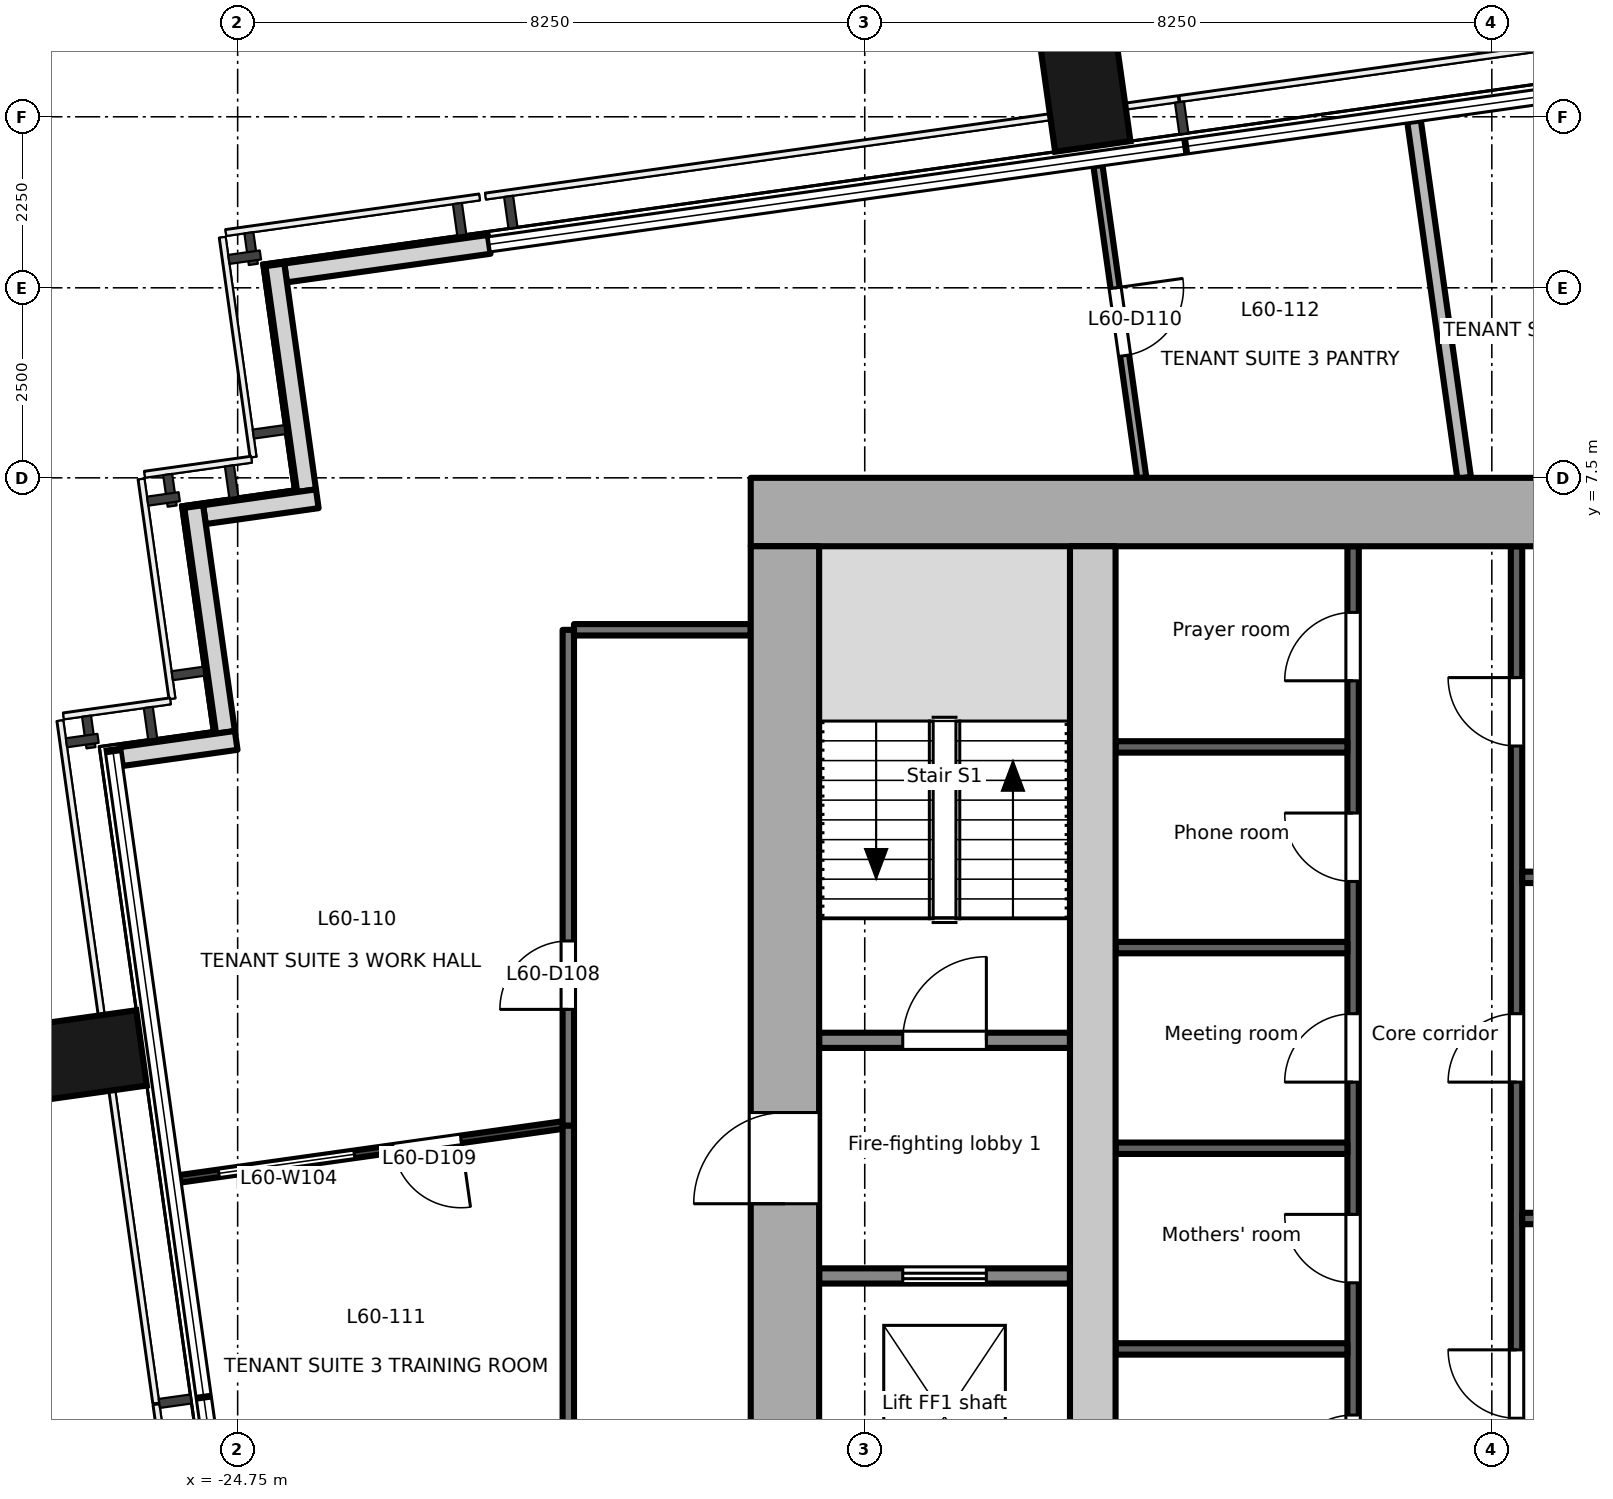
"""IFC4 building model, lengths in metres.
Left out: names, types, materials, properties, quantities, classifications, styles, units other than length and angle.
Written with IfcOpenShell. Run it as: python <this file> out.ifc"""

import sys

from ifc_helpers import new_model, si_unit, direction, frame, frame_2d, origin, origin_2d, place, context, subcontext, project, spatial, rectangle, extrude, element, fill, save


model = new_model("IFC4")
c1 = context("Model", 3, precision=1e-05, world=origin(), true_north=direction((0.0, 1.0)))
c2 = subcontext(c1, "Body", "Model", "MODEL_VIEW")
j1 = project(units=[si_unit("LENGTHUNIT", "METRE"), si_unit("PLANEANGLEUNIT", "RADIAN")], contexts=[c1])
p1 = place(None, origin())
s1 = spatial("IfcSite", under=j1, at=p1, CompositionType="ELEMENT")
p2 = place(p1, origin())
s2 = spatial("IfcBuilding", under=s1, at=p2, CompositionType="ELEMENT")
p3 = place(p2, frame((0.0, 0.0, 262.9)))
s3 = spatial("IfcBuildingStorey", under=s2, at=p3, CompositionType="ELEMENT", Elevation=262.9)
for number, where, z_axis, x_axis in (
    (1, (-26.906, -0.125, -0.2), (0.0, 0.0, 1.0), (-0.139, 0.99, 0.0)),
    (2, (-13.625, 12.751, -0.2), (0.0, 0.0, 1.0), (0.99, 0.139, 0.0)),
):
    element("IfcColumn", number, at=place(p3, frame(where, z_axis=z_axis, x_axis=x_axis)), inside=s3, PredefinedType="COLUMN", context=c2, shape_type="SweptSolid", body=[
        extrude(rectangle(XDim=1.0, YDim=1.8, at=origin_2d()), origin(), (0.0, 0.0, 1.0), 3.9),
    ])
p4 = place(p3, frame((-21.44, 10.572, 0.0), z_axis=(0.0, 0.0, 1.0), x_axis=(-0.990293105353, -0.138994839796, 0.0)))
e3 = element("IfcWall", 3, at=p4, inside=s3, PredefinedType="SOLIDWALL", context=c2, shape_type="SweptSolid", body=[
    extrude(rectangle(XDim=2.705, YDim=0.25, at=frame_2d((1.353, 0.0))), origin(), (0.0, 0.0, 1.0), 3.7),
])
p5 = place(p3, frame((-24.26, 10.302, 0.0), z_axis=(0.0, 0.0, 1.0), x_axis=(0.138994228812, -0.990293191109, 0.0)))
e4 = element("IfcWall", 4, at=p5, inside=s3, PredefinedType="SOLIDWALL", context=c2, shape_type="SweptSolid", body=[
    extrude(rectangle(XDim=3.0, YDim=0.25, at=frame_2d((1.5, 0.0))), origin(), (0.0, 0.0, 1.0), 3.7),
])
p6 = place(p3, frame((-23.702, 7.225, 0.0), z_axis=(0.0, 0.0, 1.0), x_axis=(-0.990243596651, -0.13934711799, 0.0)))
e5 = element("IfcWall", 5, at=p6, inside=s3, PredefinedType="SOLIDWALL", context=c2, shape_type="SweptSolid", body=[
    extrude(rectangle(XDim=1.5, YDim=0.25, at=frame_2d((0.75, 0.0))), origin(), (0.0, 0.0, 1.0), 3.7),
])
p7 = place(p3, frame((-25.328, 7.122, 0.0), z_axis=(0.0, 0.0, 1.0), x_axis=(0.139358350296, -0.990242015975, 0.0)))
e6 = element("IfcWall", 6, at=p7, inside=s3, PredefinedType="SOLIDWALL", context=c2, shape_type="SweptSolid", body=[
    extrude(rectangle(XDim=2.999, YDim=0.25, at=frame_2d((1.5, 0.0))), origin(), (0.0, 0.0, 1.0), 3.7),
])
p8 = place(p3, frame((-24.769, 4.046, 0.0), z_axis=(0.0, 0.0, 1.0), x_axis=(-0.990260716096, -0.139225407725, 0.0)))
e7 = element("IfcWall", 7, at=p8, inside=s3, PredefinedType="SOLIDWALL", context=c2, shape_type="SweptSolid", body=[
    extrude(rectangle(XDim=1.526, YDim=0.25, at=frame_2d((0.763, 0.0))), origin(), (0.0, 0.0, 1.0), 3.7),
])
p9 = place(p3, frame((-18.0, 7.05, -0.2), z_axis=(0.0, 0.0, 1.0), x_axis=(1.0, 0.0, 0.0)))
e8 = element("IfcWall", 8, at=p9, inside=s3, PredefinedType="SHEAR", context=c2, shape_type="SweptSolid", body=[
    extrude(rectangle(XDim=36.0, YDim=0.9, at=frame_2d((18.0, 0.0))), origin(), (0.0, 0.0, 1.0), 3.9),
])
p10 = place(p3, frame((-17.55, -6.6, -0.2), z_axis=(0.0, 0.0, 1.0), x_axis=(0.0, 1.0, 0.0)))
e9 = element("IfcWall", 9, at=p10, inside=s3, PredefinedType="SHEAR", context=c2, shape_type="SweptSolid", body=[
    extrude(rectangle(XDim=13.2, YDim=0.9, at=frame_2d((6.6, 0.0))), origin(), (0.0, 0.0, 1.0), 3.9),
])
p11 = place(p10, frame((4.55, 0.0, 0.2)))
e10 = element("IfcOpeningElement", 10, at=p11, cuts=e9, PredefinedType="OPENING", context=c2, shape_type="SweptSolid", body=[
    extrude(rectangle(XDim=1.2, YDim=2.1, at=frame_2d((0.6, 1.05))), frame((0.0, 0.46, 0.0), z_axis=(0.0, -1.0, 0.0), x_axis=(1.0, 0.0, 0.0)), (0.0, 0.0, 1.0), 0.921),
])
p12 = place(p3, frame((-13.5, -6.6, -0.2), z_axis=(0.0, 0.0, 1.0), x_axis=(0.0, 1.0, 0.0)))
e11 = element("IfcWall", 11, at=p12, inside=s3, PredefinedType="SHEAR", context=c2, shape_type="SweptSolid", body=[
    extrude(rectangle(XDim=13.2, YDim=0.6, at=frame_2d((6.6, 0.0))), origin(), (0.0, 0.0, 1.0), 3.9),
])
p13 = place(p3, frame((-17.1, -3.0, 0.0), z_axis=(0.0, 0.0, 1.0), x_axis=(1.0, 0.0, 0.0)))
e12 = element("IfcWall", 12, at=p13, inside=s3, PredefinedType="PARTITIONING", context=c2, shape_type="SweptSolid", body=[
    extrude(rectangle(XDim=3.3, YDim=0.2, at=frame_2d((1.65, 0.0))), origin(), (0.0, 0.0, 1.0), 3.7),
])
p14 = place(p13, frame((1.1, 0.0, 0.0)))
e13 = element("IfcOpeningElement", 13, at=p14, cuts=e12, PredefinedType="OPENING", context=c2, shape_type="SweptSolid", body=[
    extrude(rectangle(XDim=1.1, YDim=2.1, at=frame_2d((0.55, 1.05))), frame((0.0, 0.111, 0.0), z_axis=(0.0, -1.0, 0.0), x_axis=(1.0, 0.0, 0.0)), (0.0, 0.0, 1.0), 0.221),
])
p15 = place(p3, frame((-17.1, 0.1, 0.0), z_axis=(0.0, 0.0, 1.0), x_axis=(1.0, 0.0, 0.0)))
e14 = element("IfcWall", 14, at=p15, inside=s3, PredefinedType="PARTITIONING", context=c2, shape_type="SweptSolid", body=[
    extrude(rectangle(XDim=3.3, YDim=0.2, at=frame_2d((1.65, 0.0))), origin(), (0.0, 0.0, 1.0), 3.7),
])
p16 = place(p15, frame((1.1, 0.0, 0.0)))
e15 = element("IfcOpeningElement", 15, at=p16, cuts=e14, PredefinedType="OPENING", context=c2, shape_type="SweptSolid", body=[
    extrude(rectangle(XDim=1.1, YDim=2.1, at=frame_2d((0.55, 1.05))), frame((0.0, 0.111, 0.0), z_axis=(0.0, -1.0, 0.0), x_axis=(1.0, 0.0, 0.0)), (0.0, 0.0, 1.0), 0.221),
])
p17 = place(p3, frame((-10.075, -6.6, 0.0), z_axis=(0.0, 0.0, 1.0), x_axis=(0.0, 1.0, 0.0)))
e16 = element("IfcWall", 16, at=p17, inside=s3, PredefinedType="PARTITIONING", context=c2, shape_type="SweptSolid", body=[
    extrude(rectangle(XDim=13.2, YDim=0.15, at=frame_2d((6.6, 0.0))), origin(), (0.0, 0.0, 1.0), 3.7),
])
p18 = place(p17, frame((0.87, 0.0, 0.0)))
e17 = element("IfcOpeningElement", 17, at=p18, cuts=e16, PredefinedType="OPENING", context=c2, shape_type="SweptSolid", body=[
    extrude(rectangle(XDim=0.9, YDim=2.1, at=frame_2d((0.45, 1.05))), frame((0.0, 0.085, 0.0), z_axis=(0.0, -1.0, 0.0), x_axis=(1.0, 0.0, 0.0)), (0.0, 0.0, 1.0), 0.171),
])
p19 = place(p17, frame((3.51, 0.0, 0.0)))
e18 = element("IfcOpeningElement", 18, at=p19, cuts=e16, PredefinedType="OPENING", context=c2, shape_type="SweptSolid", body=[
    extrude(rectangle(XDim=0.9, YDim=2.1, at=frame_2d((0.45, 1.05))), frame((0.0, 0.085, 0.0), z_axis=(0.0, -1.0, 0.0), x_axis=(1.0, 0.0, 0.0)), (0.0, 0.0, 1.0), 0.171),
])
p20 = place(p17, frame((6.15, 0.0, 0.0)))
e19 = element("IfcOpeningElement", 19, at=p20, cuts=e16, PredefinedType="OPENING", context=c2, shape_type="SweptSolid", body=[
    extrude(rectangle(XDim=0.9, YDim=2.1, at=frame_2d((0.45, 1.05))), frame((0.0, 0.085, 0.0), z_axis=(0.0, -1.0, 0.0), x_axis=(1.0, 0.0, 0.0)), (0.0, 0.0, 1.0), 0.171),
])
p21 = place(p17, frame((8.79, 0.0, 0.0)))
e20 = element("IfcOpeningElement", 20, at=p21, cuts=e16, PredefinedType="OPENING", context=c2, shape_type="SweptSolid", body=[
    extrude(rectangle(XDim=0.9, YDim=2.1, at=frame_2d((0.45, 1.05))), frame((0.0, 0.085, 0.0), z_axis=(0.0, -1.0, 0.0), x_axis=(1.0, 0.0, 0.0)), (0.0, 0.0, 1.0), 0.171),
])
p22 = place(p17, frame((11.43, 0.0, 0.0)))
e21 = element("IfcOpeningElement", 21, at=p22, cuts=e16, PredefinedType="OPENING", context=c2, shape_type="SweptSolid", body=[
    extrude(rectangle(XDim=0.9, YDim=2.1, at=frame_2d((0.45, 1.05))), frame((0.0, 0.085, 0.0), z_axis=(0.0, -1.0, 0.0), x_axis=(1.0, 0.0, 0.0)), (0.0, 0.0, 1.0), 0.171),
])
for number, where, z_axis, x_axis in (
    (22, (-13.2, -3.96, 0.0), (0.0, 0.0, 1.0), (1.0, 0.0, 0.0)),
    (23, (-13.2, -1.32, 0.0), (0.0, 0.0, 1.0), (1.0, 0.0, 0.0)),
    (24, (-13.2, 1.32, 0.0), (0.0, 0.0, 1.0), (1.0, 0.0, 0.0)),
    (25, (-13.2, 3.96, 0.0), (0.0, 0.0, 1.0), (1.0, 0.0, 0.0)),
):
    element("IfcWall", number, at=place(p3, frame(where, z_axis=z_axis, x_axis=x_axis)), inside=s3, PredefinedType="PARTITIONING", context=c2, shape_type="SweptSolid", body=[
        extrude(rectangle(XDim=3.05, YDim=0.15, at=frame_2d((1.525, 0.0))), origin(), (0.0, 0.0, 1.0), 3.7),
    ])
p23 = place(p3, frame((-7.925, -6.6, 0.0), z_axis=(0.0, 0.0, 1.0), x_axis=(0.0, 1.0, 0.0)))
e26 = element("IfcWall", 26, at=p23, inside=s3, PredefinedType="PARTITIONING", context=c2, shape_type="SweptSolid", body=[
    extrude(rectangle(XDim=13.2, YDim=0.15, at=frame_2d((6.6, 0.0))), origin(), (0.0, 0.0, 1.0), 3.7),
])
p24 = place(p23, frame((1.728, 0.0, 0.0)))
e27 = element("IfcOpeningElement", 27, at=p24, cuts=e26, PredefinedType="OPENING", context=c2, shape_type="SweptSolid", body=[
    extrude(rectangle(XDim=0.9, YDim=2.1, at=frame_2d((0.45, 1.05))), frame((0.0, 0.085, 0.0), z_axis=(0.0, -1.0, 0.0), x_axis=(1.0, 0.0, 0.0)), (0.0, 0.0, 1.0), 0.171),
])
p25 = place(p23, frame((6.15, 0.0, 0.0)))
e28 = element("IfcOpeningElement", 28, at=p25, cuts=e26, PredefinedType="OPENING", context=c2, shape_type="SweptSolid", body=[
    extrude(rectangle(XDim=0.9, YDim=2.1, at=frame_2d((0.45, 1.05))), frame((0.0, 0.085, 0.0), z_axis=(0.0, -1.0, 0.0), x_axis=(1.0, 0.0, 0.0)), (0.0, 0.0, 1.0), 0.171),
])
p26 = place(p23, frame((10.572, 0.0, 0.0)))
e29 = element("IfcOpeningElement", 29, at=p26, cuts=e26, PredefinedType="OPENING", context=c2, shape_type="SweptSolid", body=[
    extrude(rectangle(XDim=0.9, YDim=2.1, at=frame_2d((0.45, 1.05))), frame((0.0, 0.085, 0.0), z_axis=(0.0, -1.0, 0.0), x_axis=(1.0, 0.0, 0.0)), (0.0, 0.0, 1.0), 0.171),
])
for number, where, z_axis, x_axis in (
    (30, (-7.85, -2.244, 0.0), (0.0, 0.0, 1.0), (1.0, 0.0, 0.0)),
    (31, (-7.85, 2.244, 0.0), (0.0, 0.0, 1.0), (1.0, 0.0, 0.0)),
):
    element("IfcWall", number, at=place(p3, frame(where, z_axis=z_axis, x_axis=x_axis)), inside=s3, PredefinedType="PARTITIONING", context=c2, shape_type="SweptSolid", body=[
        extrude(rectangle(XDim=3.05, YDim=0.15, at=frame_2d((1.525, 0.0))), origin(), (0.0, 0.0, 1.0), 3.7),
    ])
p27 = place(p3, frame((-20.4, -1.024, 0.0), z_axis=(0.0, 0.0, 1.0), x_axis=(0.0, 1.0, 0.0)))
e32 = element("IfcWall", 32, at=p27, inside=s3, PredefinedType="PARTITIONING", context=c2, shape_type="SweptSolid", body=[
    extrude(rectangle(XDim=6.524, YDim=0.15, at=frame_2d((3.262, 0.0))), origin(), (0.0, 0.0, 1.0), 3.3),
])
p28 = place(p27, frame((1.531, 0.0, 0.0)))
e33 = element("IfcOpeningElement", 33, at=p28, cuts=e32, PredefinedType="OPENING", context=c2, shape_type="SweptSolid", body=[
    extrude(rectangle(XDim=0.9, YDim=2.1, at=frame_2d((0.45, 1.05))), frame((0.0, 0.085, 0.0), z_axis=(0.0, -1.0, 0.0), x_axis=(1.0, 0.0, 0.0)), (0.0, 0.0, 1.0), 0.171),
])
p29 = place(p3, frame((-20.325, 5.501, 0.0), z_axis=(0.0, 0.0, 1.0), x_axis=(1.0, 0.0, 0.0)))
e34 = element("IfcWall", 34, at=p29, inside=s3, PredefinedType="PARTITIONING", context=c2, shape_type="SweptSolid", body=[
    extrude(rectangle(XDim=2.325, YDim=0.15, at=frame_2d((1.163, 0.0))), origin(), (0.0, 0.0, 1.0), 3.7),
])
p30 = place(p3, frame((-20.4, -7.5, 0.0), z_axis=(0.0, 0.0, 1.0), x_axis=(0.0, 1.0, 0.0)))
e35 = element("IfcWall", 35, at=p30, inside=s3, PredefinedType="PARTITIONING", context=c2, shape_type="SweptSolid", body=[
    extrude(rectangle(XDim=6.476, YDim=0.15, at=frame_2d((3.238, 0.0))), origin(), (0.0, 0.0, 1.0), 3.3),
])
p31 = place(p3, frame((-20.468, -1.014, 0.0), z_axis=(0.0, 0.0, 1.0), x_axis=(-0.990280538481, -0.139084345292, 0.0)))
e36 = element("IfcWall", 36, at=p31, inside=s3, PredefinedType="PARTITIONING", context=c2, shape_type="SweptSolid", body=[
    extrude(rectangle(XDim=5.091, YDim=0.1, at=frame_2d((2.545, 0.0))), origin(), (0.0, 0.0, 1.0), 3.7),
])
p32 = place(p31, frame((1.357, 0.0, 0.0)))
e37 = element("IfcOpeningElement", 37, at=p32, cuts=e36, PredefinedType="OPENING", context=c2, shape_type="SweptSolid", body=[
    extrude(rectangle(XDim=0.9, YDim=2.1, at=frame_2d((0.45, 1.05))), frame((0.0, 0.061, 0.0), z_axis=(0.0, -1.0, 0.0), x_axis=(1.0, 0.0, 0.0)), (0.0, 0.0, 1.0), 0.121),
])
p33 = place(p31, frame((2.774, 0.0, 0.9)))
e38 = element("IfcOpeningElement", 38, at=p33, cuts=e36, PredefinedType="OPENING", context=c2, shape_type="SweptSolid", body=[
    extrude(rectangle(XDim=1.8, YDim=1.2, at=frame_2d((0.9, 0.6))), frame((0.0, 0.061, 0.0), z_axis=(0.0, -1.0, 0.0), x_axis=(1.0, 0.0, 0.0)), (0.0, 0.0, 1.0), 0.121),
])
p34 = place(p3, frame((-13.432, 11.607, 0.0), z_axis=(0.0, 0.0, 1.0), x_axis=(0.139105101842, -0.990277623014, 0.0)))
e39 = element("IfcWall", 39, at=p34, inside=s3, PredefinedType="PARTITIONING", context=c2, shape_type="SweptSolid", body=[
    extrude(rectangle(XDim=4.147, YDim=0.12, at=frame_2d((2.074, 0.0))), origin(), (0.0, 0.0, 1.0), 3.4),
])
p35 = place(p34, frame((1.624, 0.0, 0.0)))
e40 = element("IfcOpeningElement", 40, at=p35, cuts=e39, PredefinedType="OPENING", context=c2, shape_type="SweptSolid", body=[
    extrude(rectangle(XDim=0.9, YDim=2.1, at=frame_2d((0.45, 1.05))), frame((0.0, 0.071, 0.0), z_axis=(0.0, -1.0, 0.0), x_axis=(1.0, 0.0, 0.0)), (0.0, 0.0, 1.0), 0.141),
])
p36 = place(p3, frame((-9.273, 12.191, 0.0), z_axis=(0.0, 0.0, 1.0), x_axis=(0.139104789371, -0.990277666907, 0.0)))
e41 = element("IfcWall", 41, at=p36, inside=s3, PredefinedType="PARTITIONING", context=c2, shape_type="SweptSolid", body=[
    extrude(rectangle(XDim=4.737, YDim=0.18, at=frame_2d((2.369, 0.0))), origin(), (0.0, 0.0, 1.0), 3.4),
])
p37 = place(p14, origin())
e42 = element("IfcDoor", 42, at=p37, inside=s3, OperationType="DOUBLE_DOOR_SLIDING", PredefinedType="DOOR", context=c2, shape_type="SweptSolid", body=[
    extrude(rectangle(XDim=1.1, YDim=2.1, at=frame_2d((0.55, 1.05))), frame((0.0, 0.025, 0.0), z_axis=(0.0, -1.0, 0.0), x_axis=(1.0, 0.0, 0.0)), (0.0, 0.0, 1.0), 0.05),
])
fill(e13, e42)
p38 = place(p11, origin())
e43 = element("IfcDoor", 43, at=p38, inside=s3, OperationType="SINGLE_SWING_LEFT", PredefinedType="DOOR", context=c2, shape_type="SweptSolid", body=[
    extrude(rectangle(XDim=1.2, YDim=2.1, at=frame_2d((0.6, 1.05))), frame((0.0, 0.025, 0.0), z_axis=(0.0, -1.0, 0.0), x_axis=(1.0, 0.0, 0.0)), (0.0, 0.0, 1.0), 0.05),
])
fill(e10, e43)
p39 = place(p16, origin())
e44 = element("IfcDoor", 44, at=p39, inside=s3, OperationType="SINGLE_SWING_RIGHT", PredefinedType="DOOR", context=c2, shape_type="SweptSolid", body=[
    extrude(rectangle(XDim=1.1, YDim=2.1, at=frame_2d((0.55, 1.05))), frame((0.0, 0.025, 0.0), z_axis=(0.0, -1.0, 0.0), x_axis=(1.0, 0.0, 0.0)), (0.0, 0.0, 1.0), 0.05),
])
fill(e15, e44)
p40 = place(p18, origin())
e45 = element("IfcDoor", 45, at=p40, inside=s3, OperationType="SINGLE_SWING_LEFT", PredefinedType="DOOR", context=c2, shape_type="SweptSolid", body=[
    extrude(rectangle(XDim=0.9, YDim=2.1, at=frame_2d((0.45, 1.05))), frame((0.0, 0.025, 0.0), z_axis=(0.0, -1.0, 0.0), x_axis=(1.0, 0.0, 0.0)), (0.0, 0.0, 1.0), 0.05),
])
fill(e17, e45)
p41 = place(p19, origin())
e46 = element("IfcDoor", 46, at=p41, inside=s3, OperationType="SINGLE_SWING_RIGHT", PredefinedType="DOOR", context=c2, shape_type="SweptSolid", body=[
    extrude(rectangle(XDim=0.9, YDim=2.1, at=frame_2d((0.45, 1.05))), frame((0.0, 0.025, 0.0), z_axis=(0.0, -1.0, 0.0), x_axis=(1.0, 0.0, 0.0)), (0.0, 0.0, 1.0), 0.05),
])
fill(e18, e46)
p42 = place(p20, origin())
e47 = element("IfcDoor", 47, at=p42, inside=s3, OperationType="SINGLE_SWING_LEFT", PredefinedType="DOOR", context=c2, shape_type="SweptSolid", body=[
    extrude(rectangle(XDim=0.9, YDim=2.1, at=frame_2d((0.45, 1.05))), frame((0.0, 0.025, 0.0), z_axis=(0.0, -1.0, 0.0), x_axis=(1.0, 0.0, 0.0)), (0.0, 0.0, 1.0), 0.05),
])
fill(e19, e47)
p43 = place(p21, origin())
e48 = element("IfcDoor", 48, at=p43, inside=s3, OperationType="SINGLE_SWING_RIGHT", PredefinedType="DOOR", context=c2, shape_type="SweptSolid", body=[
    extrude(rectangle(XDim=0.9, YDim=2.1, at=frame_2d((0.45, 1.05))), frame((0.0, 0.025, 0.0), z_axis=(0.0, -1.0, 0.0), x_axis=(1.0, 0.0, 0.0)), (0.0, 0.0, 1.0), 0.05),
])
fill(e20, e48)
p44 = place(p22, origin())
e49 = element("IfcDoor", 49, at=p44, inside=s3, OperationType="SINGLE_SWING_LEFT", PredefinedType="DOOR", context=c2, shape_type="SweptSolid", body=[
    extrude(rectangle(XDim=0.9, YDim=2.1, at=frame_2d((0.45, 1.05))), frame((0.0, 0.025, 0.0), z_axis=(0.0, -1.0, 0.0), x_axis=(1.0, 0.0, 0.0)), (0.0, 0.0, 1.0), 0.05),
])
fill(e21, e49)
p45 = place(p24, origin())
e50 = element("IfcDoor", 50, at=p45, inside=s3, OperationType="SINGLE_SWING_RIGHT", PredefinedType="DOOR", context=c2, shape_type="SweptSolid", body=[
    extrude(rectangle(XDim=0.9, YDim=2.1, at=frame_2d((0.45, 1.05))), frame((0.0, 0.025, 0.0), z_axis=(0.0, -1.0, 0.0), x_axis=(1.0, 0.0, 0.0)), (0.0, 0.0, 1.0), 0.05),
])
fill(e27, e50)
p46 = place(p25, origin())
e51 = element("IfcDoor", 51, at=p46, inside=s3, OperationType="SINGLE_SWING_LEFT", PredefinedType="DOOR", context=c2, shape_type="SweptSolid", body=[
    extrude(rectangle(XDim=0.9, YDim=2.1, at=frame_2d((0.45, 1.05))), frame((0.0, 0.025, 0.0), z_axis=(0.0, -1.0, 0.0), x_axis=(1.0, 0.0, 0.0)), (0.0, 0.0, 1.0), 0.05),
])
fill(e28, e51)
p47 = place(p26, origin())
e52 = element("IfcDoor", 52, at=p47, inside=s3, OperationType="SINGLE_SWING_RIGHT", PredefinedType="DOOR", context=c2, shape_type="SweptSolid", body=[
    extrude(rectangle(XDim=0.9, YDim=2.1, at=frame_2d((0.45, 1.05))), frame((0.0, 0.025, 0.0), z_axis=(0.0, -1.0, 0.0), x_axis=(1.0, 0.0, 0.0)), (0.0, 0.0, 1.0), 0.05),
])
fill(e29, e52)
p48 = place(p28, origin())
e53 = element("IfcDoor", 53, at=p48, inside=s3, OperationType="SINGLE_SWING_LEFT", PredefinedType="DOOR", context=c2, shape_type="SweptSolid", body=[
    extrude(rectangle(XDim=0.9, YDim=2.1, at=frame_2d((0.45, 1.05))), frame((0.0, 0.025, 0.0), z_axis=(0.0, -1.0, 0.0), x_axis=(1.0, 0.0, 0.0)), (0.0, 0.0, 1.0), 0.05),
])
fill(e33, e53)
p49 = place(p32, origin())
e54 = element("IfcDoor", 54, at=p49, inside=s3, OperationType="SINGLE_SWING_LEFT", PredefinedType="DOOR", context=c2, shape_type="SweptSolid", body=[
    extrude(rectangle(XDim=0.9, YDim=2.1, at=frame_2d((0.45, 1.05))), frame((0.0, 0.025, 0.0), z_axis=(0.0, -1.0, 0.0), x_axis=(1.0, 0.0, 0.0)), (0.0, 0.0, 1.0), 0.05),
])
fill(e37, e54)
p50 = place(p35, origin())
e55 = element("IfcDoor", 55, at=p50, inside=s3, OperationType="SINGLE_SWING_LEFT", PredefinedType="DOOR", context=c2, shape_type="SweptSolid", body=[
    extrude(rectangle(XDim=0.9, YDim=2.1, at=frame_2d((0.45, 1.05))), frame((0.0, 0.025, 0.0), z_axis=(0.0, -1.0, 0.0), x_axis=(1.0, 0.0, 0.0)), (0.0, 0.0, 1.0), 0.05),
])
fill(e40, e55)
p51 = place(p33, origin())
e56 = element("IfcWindow", 56, at=p51, inside=s3, PartitioningType="SINGLE_PANEL", PredefinedType="WINDOW", context=c2, shape_type="SweptSolid", body=[
    extrude(rectangle(XDim=1.8, YDim=1.2, at=frame_2d((0.9, 0.6))), frame((0.0, 0.03, 0.0), z_axis=(0.0, -1.0, 0.0), x_axis=(1.0, 0.0, 0.0)), (0.0, 0.0, 1.0), 0.06),
])
fill(e38, e56)
save(model, sys.argv[1])
